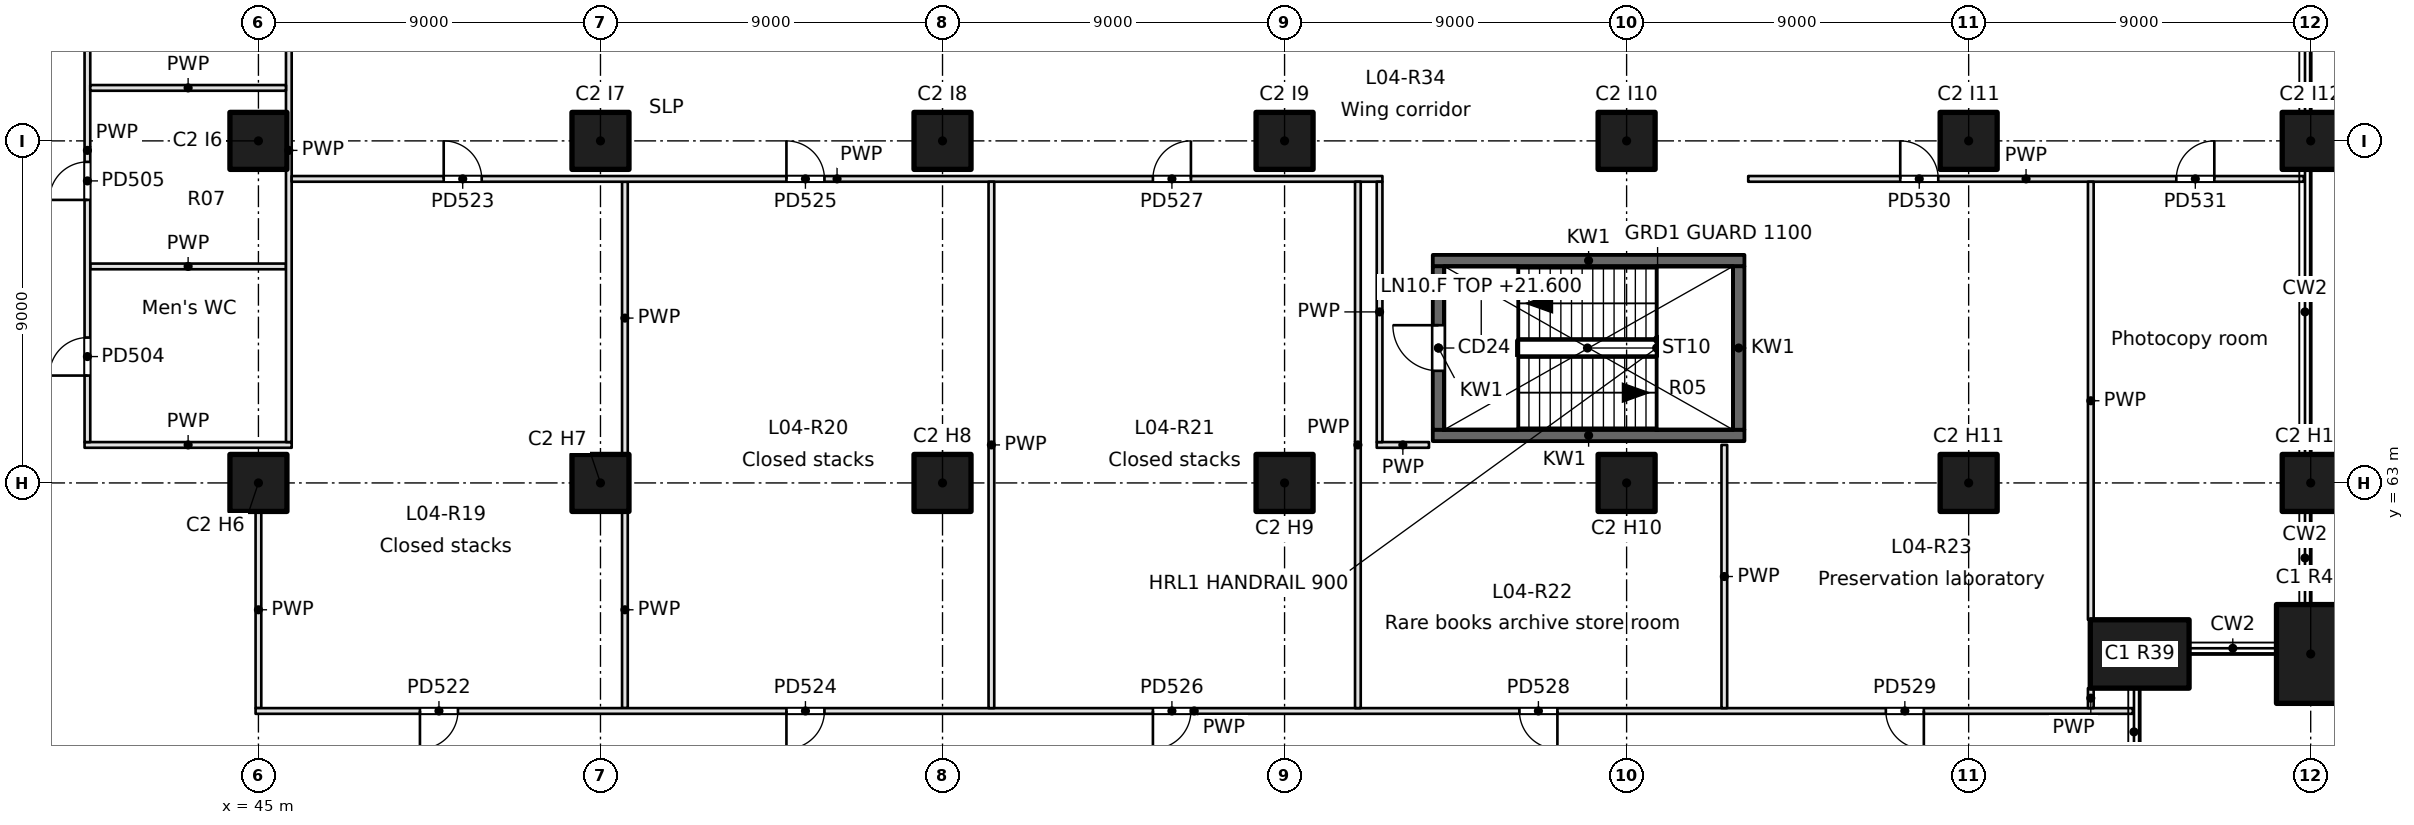
"""IFC4 building model, lengths in metres.
Left out: names, types, materials, properties, quantities, classifications, styles, units other than length and angle.
Written with IfcOpenShell. Run it as: python <this file> out.ifc"""

import sys

from ifc_helpers import new_model, si_unit, direction, frame, frame_2d, origin, origin_2d, place, context, subcontext, project, spatial, rectangle, extrude, element, fill, save


model = new_model("IFC4")
c1 = context("Model", 3, precision=1e-05, world=origin(), true_north=direction((0.0, 1.0)))
c2 = subcontext(c1, "Body", "Model", "MODEL_VIEW")
j1 = project(units=[si_unit("LENGTHUNIT", "METRE"), si_unit("PLANEANGLEUNIT", "RADIAN")], contexts=[c1])
p1 = place(None, origin())
s1 = spatial("IfcSite", under=j1, at=p1, CompositionType="ELEMENT")
p2 = place(p1, origin())
s2 = spatial("IfcBuilding", under=s1, at=p2, CompositionType="ELEMENT")
p3 = place(p2, frame((0.0, 0.0, 21.6)))
s3 = spatial("IfcBuildingStorey", under=s2, at=p3, CompositionType="ELEMENT", Elevation=21.6)
for number, where, z_axis, x_axis in (
    (1, (94.5, 58.5, 0.0), (0.0, 0.0, 1.0), (1.0, 0.0, 0.0)),
    (2, (99.0, 58.5, 0.0), (0.0, 0.0, 1.0), (0.0, 1.0, 0.0)),
):
    element("IfcColumn", number, at=place(p3, frame(where, z_axis=z_axis, x_axis=x_axis)), inside=s3, PredefinedType="COLUMN", context=c2, shape_type="SweptSolid", body=[
        extrude(rectangle(XDim=2.6, YDim=1.8, at=origin_2d()), origin(), (0.0, 0.0, 1.0), 4.8),
    ])
for number, where, z_axis, x_axis in (
    (3, (99.0, 63.0, 0.0), (0.0, 0.0, 1.0), (1.0, 0.0, 0.0)),
    (4, (99.0, 72.0, 0.0), (0.0, 0.0, 1.0), (1.0, 0.0, 0.0)),
    (5, (45.0, 63.0, 0.0), (0.0, 0.0, 1.0), (1.0, 0.0, 0.0)),
    (6, (45.0, 72.0, 0.0), (0.0, 0.0, 1.0), (1.0, 0.0, 0.0)),
    (7, (54.0, 63.0, 0.0), (0.0, 0.0, 1.0), (1.0, 0.0, 0.0)),
    (8, (54.0, 72.0, 0.0), (0.0, 0.0, 1.0), (1.0, 0.0, 0.0)),
    (9, (63.0, 63.0, 0.0), (0.0, 0.0, 1.0), (1.0, 0.0, 0.0)),
    (10, (63.0, 72.0, 0.0), (0.0, 0.0, 1.0), (1.0, 0.0, 0.0)),
    (11, (72.0, 63.0, 0.0), (0.0, 0.0, 1.0), (1.0, 0.0, 0.0)),
    (12, (72.0, 72.0, 0.0), (0.0, 0.0, 1.0), (1.0, 0.0, 0.0)),
    (13, (81.0, 63.0, 0.0), (0.0, 0.0, 1.0), (1.0, 0.0, 0.0)),
    (14, (81.0, 72.0, 0.0), (0.0, 0.0, 1.0), (1.0, 0.0, 0.0)),
    (15, (90.0, 63.0, 0.0), (0.0, 0.0, 1.0), (1.0, 0.0, 0.0)),
    (16, (90.0, 72.0, 0.0), (0.0, 0.0, 1.0), (1.0, 0.0, 0.0)),
):
    element("IfcColumn", number, at=place(p3, frame(where, z_axis=z_axis, x_axis=x_axis)), inside=s3, PredefinedType="COLUMN", context=c2, shape_type="SweptSolid", body=[
        extrude(rectangle(XDim=1.5, YDim=1.5, at=origin_2d()), origin(), (0.0, 0.0, 1.0), 4.8),
    ])
for number, where, z_axis, x_axis in (
    (17, (75.9, 64.25, -0.35), (0.0, 0.0, 1.0), (1.0, 0.0, 0.0)),
    (18, (75.9, 68.85, -0.35), (0.0, 0.0, 1.0), (1.0, 0.0, 0.0)),
):
    element("IfcWall", number, at=place(p3, frame(where, z_axis=z_axis, x_axis=x_axis)), inside=s3, PredefinedType="SOLIDWALL", context=c2, shape_type="SweptSolid", body=[
        extrude(rectangle(XDim=8.2, YDim=0.3, at=frame_2d((4.1, 0.0))), origin(), (0.0, 0.0, 1.0), 4.8),
    ])
p4 = place(p3, frame((76.05, 64.4, -0.35), z_axis=(0.0, 0.0, 1.0), x_axis=(0.0, 1.0, 0.0)))
e19 = element("IfcWall", 19, at=p4, inside=s3, PredefinedType="SOLIDWALL", context=c2, shape_type="SweptSolid", body=[
    extrude(rectangle(XDim=4.3, YDim=0.3, at=frame_2d((2.15, 0.0))), origin(), (0.0, 0.0, 1.0), 4.8),
])
p5 = place(p4, frame((1.55, 0.0, 0.35)))
e20 = element("IfcOpeningElement", 20, at=p5, cuts=e19, PredefinedType="OPENING", context=c2, shape_type="SweptSolid", body=[
    extrude(rectangle(XDim=1.2, YDim=2.1, at=frame_2d((0.6, 1.05))), frame((0.0, 0.15, 0.0), z_axis=(0.0, -1.0, 0.0), x_axis=(1.0, 0.0, 0.0)), (0.0, 0.0, 1.0), 0.3),
])
p6 = place(p3, frame((83.95, 64.4, -0.35), z_axis=(0.0, 0.0, 1.0), x_axis=(0.0, 1.0, 0.0)))
e21 = element("IfcWall", 21, at=p6, inside=s3, PredefinedType="SOLIDWALL", context=c2, shape_type="SweptSolid", body=[
    extrude(rectangle(XDim=4.3, YDim=0.3, at=frame_2d((2.15, 0.0))), origin(), (0.0, 0.0, 1.0), 4.8),
])
p7 = place(p3, frame((40.575, 68.697, 0.0), z_axis=(0.0, 0.0, 1.0), x_axis=(1.0, 0.0, 0.0)))
e22 = element("IfcWall", 22, at=p7, inside=s3, PredefinedType="PARTITIONING", context=c2, shape_type="SweptSolid", body=[
    extrude(rectangle(XDim=5.15, YDim=0.15, at=frame_2d((2.575, 0.0))), origin(), (0.0, 0.0, 1.0), 4.45),
])
p8 = place(p3, frame((45.875, 64.0, 0.0), z_axis=(0.0, 0.0, 1.0), x_axis=(-1.0, 0.0, 0.0)))
e23 = element("IfcWall", 23, at=p8, inside=s3, PredefinedType="PARTITIONING", context=c2, shape_type="SweptSolid", body=[
    extrude(rectangle(XDim=5.45, YDim=0.15, at=frame_2d((2.725, 0.0))), origin(), (0.0, 0.0, 1.0), 4.45),
])
p9 = place(p3, frame((74.425, 64.0, 0.0), z_axis=(0.0, 0.0, 1.0), x_axis=(1.0, 0.0, 0.0)))
e24 = element("IfcWall", 24, at=p9, inside=s3, PredefinedType="PARTITIONING", context=c2, shape_type="SweptSolid", body=[
    extrude(rectangle(XDim=1.375, YDim=0.15, at=frame_2d((0.688, 0.0))), origin(), (0.0, 0.0, 1.0), 4.45),
])
p10 = place(p3, frame((45.8, 79.425, 0.0), z_axis=(0.0, 0.0, 1.0), x_axis=(0.0, -1.0, 0.0)))
e25 = element("IfcWall", 25, at=p10, inside=s3, PredefinedType="PARTITIONING", context=c2, shape_type="SweptSolid", body=[
    extrude(rectangle(XDim=15.35, YDim=0.15, at=frame_2d((7.675, 0.0))), origin(), (0.0, 0.0, 1.0), 4.45),
])
p11 = place(p3, frame((40.5, 64.075, 0.0), z_axis=(0.0, 0.0, 1.0), x_axis=(0.0, 1.0, 0.0)))
e26 = element("IfcWall", 26, at=p11, inside=s3, PredefinedType="PARTITIONING", context=c2, shape_type="SweptSolid", body=[
    extrude(rectangle(XDim=15.35, YDim=0.15, at=frame_2d((7.675, 0.0))), origin(), (0.0, 0.0, 1.0), 4.45),
])
p12 = place(p11, frame((1.75, 0.0, 0.0)))
e27 = element("IfcOpeningElement", 27, at=p12, cuts=e26, PredefinedType="OPENING", context=c2, shape_type="SweptSolid", body=[
    extrude(rectangle(XDim=1.0, YDim=2.1, at=frame_2d((0.5, 1.05))), frame((0.0, 0.075, 0.0), z_axis=(0.0, -1.0, 0.0), x_axis=(1.0, 0.0, 0.0)), (0.0, 0.0, 1.0), 0.15),
])
p13 = place(p11, frame((6.372, 0.0, 0.0)))
e28 = element("IfcOpeningElement", 28, at=p13, cuts=e26, PredefinedType="OPENING", context=c2, shape_type="SweptSolid", body=[
    extrude(rectangle(XDim=1.0, YDim=2.1, at=frame_2d((0.5, 1.05))), frame((0.0, 0.075, 0.0), z_axis=(0.0, -1.0, 0.0), x_axis=(1.0, 0.0, 0.0)), (0.0, 0.0, 1.0), 0.15),
])
p14 = place(p11, frame((10.569, 0.0, 0.0)))
e29 = element("IfcOpeningElement", 29, at=p14, cuts=e26, PredefinedType="OPENING", context=c2, shape_type="SweptSolid", body=[
    extrude(rectangle(XDim=1.0, YDim=2.1, at=frame_2d((0.5, 1.05))), frame((0.0, 0.075, 0.0), z_axis=(0.0, -1.0, 0.0), x_axis=(1.0, 0.0, 0.0)), (0.0, 0.0, 1.0), 0.15),
])
p15 = place(p3, frame((40.575, 73.394, 0.0), z_axis=(0.0, 0.0, 1.0), x_axis=(1.0, 0.0, 0.0)))
e30 = element("IfcWall", 30, at=p15, inside=s3, PredefinedType="PARTITIONING", context=c2, shape_type="SweptSolid", body=[
    extrude(rectangle(XDim=5.15, YDim=0.15, at=frame_2d((2.575, 0.0))), origin(), (0.0, 0.0, 1.0), 4.45),
])
for number, where, z_axis, x_axis in (
    (31, (45.0, 57.075, 0.0), (0.0, 0.0, 1.0), (0.0, 1.0, 0.0)),
    (32, (54.643, 57.075, 0.0), (0.0, 0.0, 1.0), (0.0, 1.0, 0.0)),
):
    element("IfcWall", number, at=place(p3, frame(where, z_axis=z_axis, x_axis=x_axis)), inside=s3, PredefinedType="PARTITIONING", context=c2, shape_type="SweptSolid", body=[
        extrude(rectangle(XDim=5.175, YDim=0.15, at=frame_2d((2.587, 0.0))), origin(), (0.0, 0.0, 1.0), 4.45),
    ])
p16 = place(p3, frame((54.643, 63.75, 0.0), z_axis=(0.0, 0.0, 1.0), x_axis=(0.0, 1.0, 0.0)))
e33 = element("IfcWall", 33, at=p16, inside=s3, PredefinedType="PARTITIONING", context=c2, shape_type="SweptSolid", body=[
    extrude(rectangle(XDim=7.175, YDim=0.15, at=frame_2d((3.587, 0.0))), origin(), (0.0, 0.0, 1.0), 4.45),
])
p17 = place(p3, frame((94.32, 57.0, 0.0), z_axis=(0.0, 0.0, 1.0), x_axis=(-1.0, 0.0, 0.0)))
e34 = element("IfcWall", 34, at=p17, inside=s3, PredefinedType="PARTITIONING", context=c2, shape_type="SweptSolid", body=[
    extrude(rectangle(XDim=49.395, YDim=0.15, at=frame_2d((24.698, 0.0))), origin(), (0.0, 0.0, 1.0), 4.45),
])
p18 = place(p17, frame((44.07, 0.0, 0.0)))
e35 = element("IfcOpeningElement", 35, at=p18, cuts=e34, PredefinedType="OPENING", context=c2, shape_type="SweptSolid", body=[
    extrude(rectangle(XDim=1.0, YDim=2.1, at=frame_2d((0.5, 1.05))), frame((0.0, 0.075, 0.0), z_axis=(0.0, -1.0, 0.0), x_axis=(1.0, 0.0, 0.0)), (0.0, 0.0, 1.0), 0.15),
])
p19 = place(p17, frame((34.427, 0.0, 0.0)))
e36 = element("IfcOpeningElement", 36, at=p19, cuts=e34, PredefinedType="OPENING", context=c2, shape_type="SweptSolid", body=[
    extrude(rectangle(XDim=1.0, YDim=2.1, at=frame_2d((0.5, 1.05))), frame((0.0, 0.075, 0.0), z_axis=(0.0, -1.0, 0.0), x_axis=(1.0, 0.0, 0.0)), (0.0, 0.0, 1.0), 0.15),
])
p20 = place(p17, frame((24.784, 0.0, 0.0)))
e37 = element("IfcOpeningElement", 37, at=p20, cuts=e34, PredefinedType="OPENING", context=c2, shape_type="SweptSolid", body=[
    extrude(rectangle(XDim=1.0, YDim=2.1, at=frame_2d((0.5, 1.05))), frame((0.0, 0.075, 0.0), z_axis=(0.0, -1.0, 0.0), x_axis=(1.0, 0.0, 0.0)), (0.0, 0.0, 1.0), 0.15),
])
p21 = place(p17, frame((15.141, 0.0, 0.0)))
e38 = element("IfcOpeningElement", 38, at=p21, cuts=e34, PredefinedType="OPENING", context=c2, shape_type="SweptSolid", body=[
    extrude(rectangle(XDim=1.0, YDim=2.1, at=frame_2d((0.5, 1.05))), frame((0.0, 0.075, 0.0), z_axis=(0.0, -1.0, 0.0), x_axis=(1.0, 0.0, 0.0)), (0.0, 0.0, 1.0), 0.15),
])
p22 = place(p17, frame((5.499, 0.0, 0.0)))
e39 = element("IfcOpeningElement", 39, at=p22, cuts=e34, PredefinedType="OPENING", context=c2, shape_type="SweptSolid", body=[
    extrude(rectangle(XDim=1.0, YDim=2.1, at=frame_2d((0.5, 1.05))), frame((0.0, 0.075, 0.0), z_axis=(0.0, -1.0, 0.0), x_axis=(1.0, 0.0, 0.0)), (0.0, 0.0, 1.0), 0.15),
])
p23 = place(p3, frame((45.875, 71.0, 0.0), z_axis=(0.0, 0.0, 1.0), x_axis=(1.0, 0.0, 0.0)))
e40 = element("IfcWall", 40, at=p23, inside=s3, PredefinedType="PARTITIONING", context=c2, shape_type="SweptSolid", body=[
    extrude(rectangle(XDim=28.7, YDim=0.15, at=frame_2d((14.35, 0.0))), origin(), (0.0, 0.0, 1.0), 4.45),
])
p24 = place(p23, frame((4.0, 0.0, 0.0)))
e41 = element("IfcOpeningElement", 41, at=p24, cuts=e40, PredefinedType="OPENING", context=c2, shape_type="SweptSolid", body=[
    extrude(rectangle(XDim=1.0, YDim=2.1, at=frame_2d((0.5, 1.05))), frame((0.0, 0.075, 0.0), z_axis=(0.0, -1.0, 0.0), x_axis=(1.0, 0.0, 0.0)), (0.0, 0.0, 1.0), 0.15),
])
p25 = place(p23, frame((13.018, 0.0, 0.0)))
e42 = element("IfcOpeningElement", 42, at=p25, cuts=e40, PredefinedType="OPENING", context=c2, shape_type="SweptSolid", body=[
    extrude(rectangle(XDim=1.0, YDim=2.1, at=frame_2d((0.5, 1.05))), frame((0.0, 0.075, 0.0), z_axis=(0.0, -1.0, 0.0), x_axis=(1.0, 0.0, 0.0)), (0.0, 0.0, 1.0), 0.15),
])
p26 = place(p23, frame((22.661, 0.0, 0.0)))
e43 = element("IfcOpeningElement", 43, at=p26, cuts=e40, PredefinedType="OPENING", context=c2, shape_type="SweptSolid", body=[
    extrude(rectangle(XDim=1.0, YDim=2.1, at=frame_2d((0.5, 1.05))), frame((0.0, 0.075, 0.0), z_axis=(0.0, -1.0, 0.0), x_axis=(1.0, 0.0, 0.0)), (0.0, 0.0, 1.0), 0.15),
])
p27 = place(p3, frame((84.2, 71.0, 0.0), z_axis=(0.0, 0.0, 1.0), x_axis=(1.0, 0.0, 0.0)))
e44 = element("IfcWall", 44, at=p27, inside=s3, PredefinedType="PARTITIONING", context=c2, shape_type="SweptSolid", body=[
    extrude(rectangle(XDim=14.62, YDim=0.15, at=frame_2d((7.31, 0.0))), origin(), (0.0, 0.0, 1.0), 4.45),
])
p28 = place(p27, frame((4.0, 0.0, 0.0)))
e45 = element("IfcOpeningElement", 45, at=p28, cuts=e44, PredefinedType="OPENING", context=c2, shape_type="SweptSolid", body=[
    extrude(rectangle(XDim=1.0, YDim=2.1, at=frame_2d((0.5, 1.05))), frame((0.0, 0.075, 0.0), z_axis=(0.0, -1.0, 0.0), x_axis=(1.0, 0.0, 0.0)), (0.0, 0.0, 1.0), 0.15),
])
p29 = place(p27, frame((11.264, 0.0, 0.0)))
e46 = element("IfcOpeningElement", 46, at=p29, cuts=e44, PredefinedType="OPENING", context=c2, shape_type="SweptSolid", body=[
    extrude(rectangle(XDim=1.0, YDim=2.1, at=frame_2d((0.5, 1.05))), frame((0.0, 0.075, 0.0), z_axis=(0.0, -1.0, 0.0), x_axis=(1.0, 0.0, 0.0)), (0.0, 0.0, 1.0), 0.15),
])
for number, where, z_axis, x_axis in (
    (47, (64.286, 57.075, 0.0), (0.0, 0.0, 1.0), (0.0, 1.0, 0.0)),
    (48, (73.929, 57.075, 0.0), (0.0, 0.0, 1.0), (0.0, 1.0, 0.0)),
):
    element("IfcWall", number, at=place(p3, frame(where, z_axis=z_axis, x_axis=x_axis)), inside=s3, PredefinedType="PARTITIONING", context=c2, shape_type="SweptSolid", body=[
        extrude(rectangle(XDim=13.85, YDim=0.15, at=frame_2d((6.925, 0.0))), origin(), (0.0, 0.0, 1.0), 4.45),
    ])
p30 = place(p3, frame((83.571, 57.075, 0.0), z_axis=(0.0, 0.0, 1.0), x_axis=(0.0, 1.0, 0.0)))
e49 = element("IfcWall", 49, at=p30, inside=s3, PredefinedType="PARTITIONING", context=c2, shape_type="SweptSolid", body=[
    extrude(rectangle(XDim=6.925, YDim=0.15, at=frame_2d((3.462, 0.0))), origin(), (0.0, 0.0, 1.0), 4.45),
])
p31 = place(p3, frame((74.5, 70.925, 0.0), z_axis=(0.0, 0.0, 1.0), x_axis=(0.0, -1.0, 0.0)))
e50 = element("IfcWall", 50, at=p31, inside=s3, PredefinedType="PARTITIONING", context=c2, shape_type="SweptSolid", body=[
    extrude(rectangle(XDim=6.85, YDim=0.15, at=frame_2d((3.425, 0.0))), origin(), (0.0, 0.0, 1.0), 4.45),
])
p32 = place(p3, frame((93.214, 57.075, 0.0), z_axis=(0.0, 0.0, 1.0), x_axis=(0.0, 1.0, 0.0)))
e51 = element("IfcWall", 51, at=p32, inside=s3, PredefinedType="PARTITIONING", context=c2, shape_type="SweptSolid", body=[
    extrude(rectangle(XDim=0.525, YDim=0.15, at=frame_2d((0.263, 0.0))), origin(), (0.0, 0.0, 1.0), 4.45),
])
p33 = place(p3, frame((93.214, 59.4, 0.0), z_axis=(0.0, 0.0, 1.0), x_axis=(0.0, 1.0, 0.0)))
e52 = element("IfcWall", 52, at=p33, inside=s3, PredefinedType="PARTITIONING", context=c2, shape_type="SweptSolid", body=[
    extrude(rectangle(XDim=11.525, YDim=0.15, at=frame_2d((5.763, 0.0))), origin(), (0.0, 0.0, 1.0), 4.45),
])
p34 = place(p5, origin())
e53 = element("IfcDoor", 53, at=p34, inside=s3, OperationType="SINGLE_SWING_RIGHT", PredefinedType="DOOR", context=c2, shape_type="SweptSolid", body=[
    extrude(rectangle(XDim=1.2, YDim=2.1, at=frame_2d((0.6, 1.05))), frame((0.0, 0.025, 0.0), z_axis=(0.0, -1.0, 0.0), x_axis=(1.0, 0.0, 0.0)), (0.0, 0.0, 1.0), 0.05),
])
fill(e20, e53)
p35 = place(p12, origin())
e54 = element("IfcDoor", 54, at=p35, inside=s3, OperationType="SINGLE_SWING_LEFT", PredefinedType="DOOR", context=c2, shape_type="SweptSolid", body=[
    extrude(rectangle(XDim=1.0, YDim=2.1, at=frame_2d((0.5, 1.05))), frame((0.0, 0.025, 0.0), z_axis=(0.0, -1.0, 0.0), x_axis=(1.0, 0.0, 0.0)), (0.0, 0.0, 1.0), 0.05),
])
fill(e27, e54)
p36 = place(p13, origin())
e55 = element("IfcDoor", 55, at=p36, inside=s3, OperationType="SINGLE_SWING_LEFT", PredefinedType="DOOR", context=c2, shape_type="SweptSolid", body=[
    extrude(rectangle(XDim=1.0, YDim=2.1, at=frame_2d((0.5, 1.05))), frame((0.0, 0.025, 0.0), z_axis=(0.0, -1.0, 0.0), x_axis=(1.0, 0.0, 0.0)), (0.0, 0.0, 1.0), 0.05),
])
fill(e28, e55)
p37 = place(p18, origin())
e56 = element("IfcDoor", 56, at=p37, inside=s3, OperationType="SINGLE_SWING_RIGHT", PredefinedType="DOOR", context=c2, shape_type="SweptSolid", body=[
    extrude(rectangle(XDim=1.0, YDim=2.1, at=frame_2d((0.5, 1.05))), frame((0.0, 0.025, 0.0), z_axis=(0.0, -1.0, 0.0), x_axis=(1.0, 0.0, 0.0)), (0.0, 0.0, 1.0), 0.05),
])
fill(e35, e56)
p38 = place(p24, origin())
e57 = element("IfcDoor", 57, at=p38, inside=s3, OperationType="SINGLE_SWING_LEFT", PredefinedType="DOOR", context=c2, shape_type="SweptSolid", body=[
    extrude(rectangle(XDim=1.0, YDim=2.1, at=frame_2d((0.5, 1.05))), frame((0.0, 0.025, 0.0), z_axis=(0.0, -1.0, 0.0), x_axis=(1.0, 0.0, 0.0)), (0.0, 0.0, 1.0), 0.05),
])
fill(e41, e57)
p39 = place(p19, origin())
e58 = element("IfcDoor", 58, at=p39, inside=s3, OperationType="SINGLE_SWING_RIGHT", PredefinedType="DOOR", context=c2, shape_type="SweptSolid", body=[
    extrude(rectangle(XDim=1.0, YDim=2.1, at=frame_2d((0.5, 1.05))), frame((0.0, 0.025, 0.0), z_axis=(0.0, -1.0, 0.0), x_axis=(1.0, 0.0, 0.0)), (0.0, 0.0, 1.0), 0.05),
])
fill(e36, e58)
p40 = place(p25, origin())
e59 = element("IfcDoor", 59, at=p40, inside=s3, OperationType="SINGLE_SWING_LEFT", PredefinedType="DOOR", context=c2, shape_type="SweptSolid", body=[
    extrude(rectangle(XDim=1.0, YDim=2.1, at=frame_2d((0.5, 1.05))), frame((0.0, 0.025, 0.0), z_axis=(0.0, -1.0, 0.0), x_axis=(1.0, 0.0, 0.0)), (0.0, 0.0, 1.0), 0.05),
])
fill(e42, e59)
p41 = place(p20, origin())
e60 = element("IfcDoor", 60, at=p41, inside=s3, OperationType="SINGLE_SWING_RIGHT", PredefinedType="DOOR", context=c2, shape_type="SweptSolid", body=[
    extrude(rectangle(XDim=1.0, YDim=2.1, at=frame_2d((0.5, 1.05))), frame((0.0, 0.025, 0.0), z_axis=(0.0, -1.0, 0.0), x_axis=(1.0, 0.0, 0.0)), (0.0, 0.0, 1.0), 0.05),
])
fill(e37, e60)
p42 = place(p26, origin())
e61 = element("IfcDoor", 61, at=p42, inside=s3, OperationType="SINGLE_SWING_RIGHT", PredefinedType="DOOR", context=c2, shape_type="SweptSolid", body=[
    extrude(rectangle(XDim=1.0, YDim=2.1, at=frame_2d((0.5, 1.05))), frame((0.0, 0.025, 0.0), z_axis=(0.0, -1.0, 0.0), x_axis=(1.0, 0.0, 0.0)), (0.0, 0.0, 1.0), 0.05),
])
fill(e43, e61)
p43 = place(p21, origin())
e62 = element("IfcDoor", 62, at=p43, inside=s3, OperationType="SINGLE_SWING_LEFT", PredefinedType="DOOR", context=c2, shape_type="SweptSolid", body=[
    extrude(rectangle(XDim=1.0, YDim=2.1, at=frame_2d((0.5, 1.05))), frame((0.0, 0.025, 0.0), z_axis=(0.0, -1.0, 0.0), x_axis=(1.0, 0.0, 0.0)), (0.0, 0.0, 1.0), 0.05),
])
fill(e38, e62)
p44 = place(p22, origin())
e63 = element("IfcDoor", 63, at=p44, inside=s3, OperationType="SINGLE_SWING_LEFT", PredefinedType="DOOR", context=c2, shape_type="SweptSolid", body=[
    extrude(rectangle(XDim=1.0, YDim=2.1, at=frame_2d((0.5, 1.05))), frame((0.0, 0.025, 0.0), z_axis=(0.0, -1.0, 0.0), x_axis=(1.0, 0.0, 0.0)), (0.0, 0.0, 1.0), 0.05),
])
fill(e39, e63)
p45 = place(p28, origin())
e64 = element("IfcDoor", 64, at=p45, inside=s3, OperationType="SINGLE_SWING_LEFT", PredefinedType="DOOR", context=c2, shape_type="SweptSolid", body=[
    extrude(rectangle(XDim=1.0, YDim=2.1, at=frame_2d((0.5, 1.05))), frame((0.0, 0.025, 0.0), z_axis=(0.0, -1.0, 0.0), x_axis=(1.0, 0.0, 0.0)), (0.0, 0.0, 1.0), 0.05),
])
fill(e45, e64)
p46 = place(p29, origin())
e65 = element("IfcDoor", 65, at=p46, inside=s3, OperationType="SINGLE_SWING_RIGHT", PredefinedType="DOOR", context=c2, shape_type="SweptSolid", body=[
    extrude(rectangle(XDim=1.0, YDim=2.1, at=frame_2d((0.5, 1.05))), frame((0.0, 0.025, 0.0), z_axis=(0.0, -1.0, 0.0), x_axis=(1.0, 0.0, 0.0)), (0.0, 0.0, 1.0), 0.05),
])
fill(e46, e65)
save(model, sys.argv[1])
